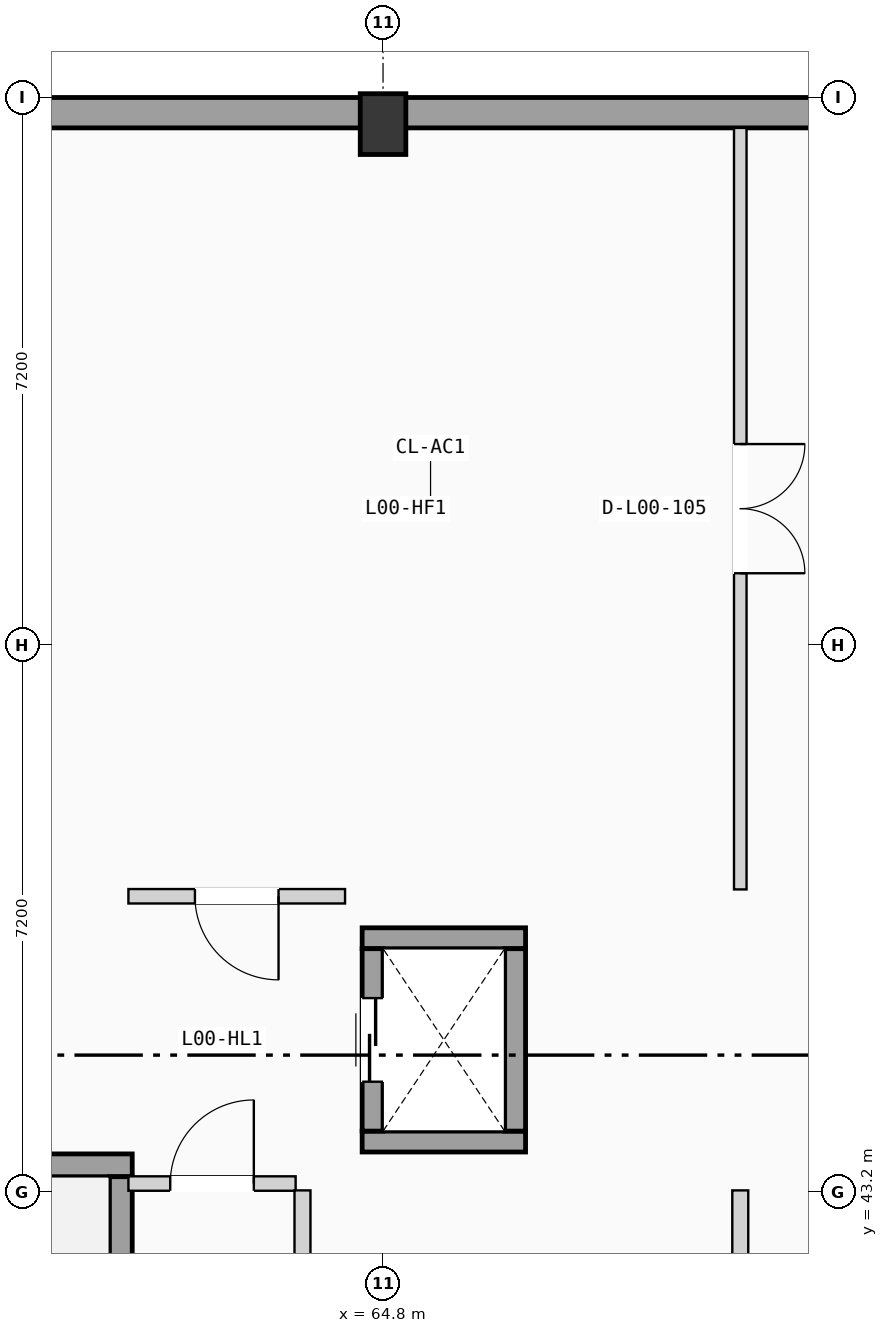
"""IFC4 building model, lengths in metres.
Left out: names, types, materials, properties, quantities, classifications, styles, units other than length and angle.
Written with IfcOpenShell. Run it as: python <this file> out.ifc"""

import sys

from ifc_helpers import new_model, si_unit, direction, frame, frame_2d, origin, origin_2d, place, context, subcontext, project, spatial, rectangle, extrude, element, fill, save


model = new_model("IFC4")
c1 = context("Model", 3, precision=1e-05, world=origin(), true_north=direction((0.0, 1.0)))
c2 = subcontext(c1, "Body", "Model", "MODEL_VIEW")
j1 = project(units=[si_unit("LENGTHUNIT", "METRE"), si_unit("PLANEANGLEUNIT", "RADIAN")], contexts=[c1])
p1 = place(None, origin())
s1 = spatial("IfcSite", under=j1, at=p1, CompositionType="ELEMENT")
p2 = place(p1, origin())
s2 = spatial("IfcBuilding", under=s1, at=p2, CompositionType="ELEMENT")
p3 = place(p2, origin())
s3 = spatial("IfcBuildingStorey", under=s2, at=p3, CompositionType="ELEMENT", Elevation=0.0)
p4 = place(p3, frame((64.8, 57.25, 0.0), z_axis=(0.0, 0.0, 1.0), x_axis=(1.0, 0.0, 0.0)))
e1 = element("IfcColumn", 1, at=p4, inside=s3, PredefinedType="COLUMN", context=c2, shape_type="SweptSolid", body=[
    extrude(rectangle(XDim=0.6, YDim=0.8, at=origin_2d()), origin(), (0.0, 0.0, 1.0), 4.9),
])
p5 = place(p3, frame((57.6, 57.4, 0.0), z_axis=(0.0, 0.0, 1.0), x_axis=(1.0, 0.0, 0.0)))
e2 = element("IfcWall", 2, at=p5, inside=s3, PredefinedType="SOLIDWALL", context=c2, shape_type="SweptSolid", body=[
    extrude(rectangle(XDim=50.4, YDim=0.4, at=frame_2d((25.2, 0.0))), origin(), (0.0, 0.0, 1.0), 4.63),
])
p6 = place(p5, frame((47.5, 0.0, 0.0)))
e3 = element("IfcOpeningElement", 3, at=p6, cuts=e2, PredefinedType="OPENING", context=c2, shape_type="SweptSolid", body=[
    extrude(rectangle(XDim=1.3, YDim=2.2, at=frame_2d((0.65, 1.1))), frame((0.0, 0.21, 0.0), z_axis=(0.0, -1.0, 0.0), x_axis=(1.0, 0.0, 0.0)), (0.0, 0.0, 1.0), 0.42),
])
p7 = place(p5, frame((24.15, 0.0, 0.0)))
e4 = element("IfcOpeningElement", 4, at=p7, cuts=e2, PredefinedType="OPENING", context=c2, shape_type="SweptSolid", body=[
    extrude(rectangle(XDim=2.1, YDim=2.45, at=frame_2d((1.05, 1.225))), frame((0.0, 0.21, 0.0), z_axis=(0.0, -1.0, 0.0), x_axis=(1.0, 0.0, 0.0)), (0.0, 0.0, 1.0), 0.42),
])
p8 = place(p3, frame((57.9, 43.55, 0.0), z_axis=(0.0, 0.0, 1.0), x_axis=(1.0, 0.0, 0.0)))
e5 = element("IfcWall", 5, at=p8, inside=s3, PredefinedType="SHEAR", context=c2, shape_type="SweptSolid", body=[
    extrude(rectangle(XDim=3.6, YDim=0.3, at=frame_2d((1.8, 0.0))), origin(), (0.0, 0.0, 1.0), 4.63),
])
p9 = place(p3, frame((61.35, 36.4, 0.0), z_axis=(0.0, 0.0, 1.0), x_axis=(0.0, 1.0, 0.0)))
e6 = element("IfcWall", 6, at=p9, inside=s3, PredefinedType="SHEAR", context=c2, shape_type="SweptSolid", body=[
    extrude(rectangle(XDim=7.0, YDim=0.3, at=frame_2d((3.5, 0.0))), origin(), (0.0, 0.0, 1.0), 4.63),
])
p10 = place(p9, frame((0.225, 0.0, 0.0)))
e7 = element("IfcOpeningElement", 7, at=p10, cuts=e6, PredefinedType="OPENING", context=c2, shape_type="SweptSolid", body=[
    extrude(rectangle(XDim=1.15, YDim=2.12, at=frame_2d((0.575, 1.06))), frame((0.0, 0.16, 0.0), z_axis=(0.0, -1.0, 0.0), x_axis=(1.0, 0.0, 0.0)), (0.0, 0.0, 1.0), 0.32),
])
for number, where, z_axis, x_axis in (
    (8, (64.525, 43.863, 0.0), (0.0, 0.0, 1.0), (1.0, 0.0, 0.0)),
    (9, (64.525, 46.538, 0.0), (0.0, 0.0, 1.0), (1.0, 0.0, 0.0)),
):
    element("IfcWall", number, at=place(p3, frame(where, z_axis=z_axis, x_axis=x_axis)), inside=s3, PredefinedType="SHEAR", context=c2, shape_type="SweptSolid", body=[
        extrude(rectangle(XDim=2.15, YDim=0.275, at=frame_2d((1.075, 0.0))), origin(), (0.0, 0.0, 1.0), 4.63),
    ])
p11 = place(p3, frame((64.663, 44.0, 0.0), z_axis=(0.0, 0.0, 1.0), x_axis=(0.0, 1.0, 0.0)))
e10 = element("IfcWall", 10, at=p11, inside=s3, PredefinedType="SHEAR", context=c2, shape_type="SweptSolid", body=[
    extrude(rectangle(XDim=2.4, YDim=0.275, at=frame_2d((1.2, 0.0))), origin(), (0.0, 0.0, 1.0), 4.63),
])
p12 = place(p11, frame((0.65, 0.0, 0.0)))
e11 = element("IfcOpeningElement", 11, at=p12, cuts=e10, PredefinedType="OPENING", context=c2, shape_type="SweptSolid", body=[
    extrude(rectangle(XDim=1.1, YDim=2.15, at=frame_2d((0.55, 1.075))), frame((0.0, 0.147, 0.0), z_axis=(0.0, -1.0, 0.0), x_axis=(1.0, 0.0, 0.0)), (0.0, 0.0, 1.0), 0.295),
])
p13 = place(p3, frame((66.538, 44.0, 0.0), z_axis=(0.0, 0.0, 1.0), x_axis=(0.0, 1.0, 0.0)))
e12 = element("IfcWall", 12, at=p13, inside=s3, PredefinedType="SHEAR", context=c2, shape_type="SweptSolid", body=[
    extrude(rectangle(XDim=2.4, YDim=0.275, at=frame_2d((1.2, 0.0))), origin(), (0.0, 0.0, 1.0), 4.63),
])
p14 = place(p3, frame((61.45, 43.31, 0.0), z_axis=(0.0, 0.0, 1.0), x_axis=(1.0, 0.0, 0.0)))
e13 = element("IfcWall", 13, at=p14, inside=s3, PredefinedType="PARTITIONING", context=c2, shape_type="SweptSolid", body=[
    extrude(rectangle(XDim=2.2, YDim=0.19, at=frame_2d((1.1, 0.0))), origin(), (0.0, 0.0, 1.0), 3.84),
])
p15 = place(p14, frame((0.55, 0.0, 0.0)))
e14 = element("IfcOpeningElement", 14, at=p15, cuts=e13, PredefinedType="OPENING", context=c2, shape_type="SweptSolid", body=[
    extrude(rectangle(XDim=1.1, YDim=2.12, at=frame_2d((0.55, 1.06))), frame((0.0, 0.105, 0.0), z_axis=(0.0, -1.0, 0.0), x_axis=(1.0, 0.0, 0.0)), (0.0, 0.0, 1.0), 0.21),
])
p16 = place(p3, frame((63.74, 36.4, 0.0), z_axis=(0.0, 0.0, 1.0), x_axis=(0.0, 1.0, 0.0)))
e15 = element("IfcWall", 15, at=p16, inside=s3, PredefinedType="PARTITIONING", context=c2, shape_type="SweptSolid", body=[
    extrude(rectangle(XDim=6.82, YDim=0.21, at=frame_2d((3.41, 0.0))), origin(), (0.0, 0.0, 1.0), 3.84),
])
p17 = place(p16, frame((2.9, 0.0, 0.0)))
e16 = element("IfcOpeningElement", 16, at=p17, cuts=e15, PredefinedType="OPENING", context=c2, shape_type="SweptSolid", body=[
    extrude(rectangle(XDim=1.02, YDim=2.16, at=frame_2d((0.51, 1.08))), frame((0.0, 0.115, 0.0), z_axis=(0.0, -1.0, 0.0), x_axis=(1.0, 0.0, 0.0)), (0.0, 0.0, 1.0), 0.23),
])
p18 = place(p3, frame((61.45, 47.09, 0.0), z_axis=(0.0, 0.0, 1.0), x_axis=(1.0, 0.0, 0.0)))
e17 = element("IfcWall", 17, at=p18, inside=s3, PredefinedType="PARTITIONING", context=c2, shape_type="SweptSolid", body=[
    extrude(rectangle(XDim=2.85, YDim=0.19, at=frame_2d((1.425, 0.0))), origin(), (0.0, 0.0, 1.0), 3.84),
])
p19 = place(p18, frame((0.875, 0.0, 0.0)))
e18 = element("IfcOpeningElement", 18, at=p19, cuts=e17, PredefinedType="OPENING", context=c2, shape_type="SweptSolid", body=[
    extrude(rectangle(XDim=1.1, YDim=2.12, at=frame_2d((0.55, 1.06))), frame((0.0, 0.105, 0.0), z_axis=(0.0, -1.0, 0.0), x_axis=(1.0, 0.0, 0.0)), (0.0, 0.0, 1.0), 0.21),
])
p20 = place(p3, frame((69.5, 47.18, 0.0), z_axis=(0.0, 0.0, 1.0), x_axis=(0.0, 1.0, 0.0)))
e19 = element("IfcWall", 19, at=p20, inside=s3, PredefinedType="PARTITIONING", context=c2, shape_type="SweptSolid", body=[
    extrude(rectangle(XDim=10.02, YDim=0.165, at=frame_2d((5.01, 0.0))), origin(), (0.0, 0.0, 1.0), 3.84),
])
p21 = place(p20, frame((4.16, 0.0, 0.0)))
e20 = element("IfcOpeningElement", 20, at=p21, cuts=e19, PredefinedType="OPENING", context=c2, shape_type="SweptSolid", body=[
    extrude(rectangle(XDim=1.7, YDim=2.28, at=frame_2d((0.85, 1.14))), frame((0.0, 0.093, 0.0), z_axis=(0.0, -1.0, 0.0), x_axis=(1.0, 0.0, 0.0)), (0.0, 0.0, 1.0), 0.185),
])
p22 = place(p3, frame((69.5, 39.4, 0.0), z_axis=(0.0, 0.0, 1.0), x_axis=(0.0, 1.0, 0.0)))
e21 = element("IfcWall", 21, at=p22, inside=s3, PredefinedType="PARTITIONING", context=c2, shape_type="SweptSolid", body=[
    extrude(rectangle(XDim=3.82, YDim=0.21, at=frame_2d((1.91, 0.0))), origin(), (0.0, 0.0, 1.0), 3.84),
])
p23 = place(p22, frame((1.34, 0.0, 0.0)))
e22 = element("IfcOpeningElement", 22, at=p23, cuts=e21, PredefinedType="OPENING", context=c2, shape_type="SweptSolid", body=[
    extrude(rectangle(XDim=1.14, YDim=2.18, at=frame_2d((0.57, 1.09))), frame((0.0, 0.115, 0.0), z_axis=(0.0, -1.0, 0.0), x_axis=(1.0, 0.0, 0.0)), (0.0, 0.0, 1.0), 0.23),
])
p24 = place(p12, origin())
e23 = element("IfcDoor", 23, at=p24, inside=s3, OperationType="SLIDING_TO_LEFT", PredefinedType="DOOR", context=c2, shape_type="SweptSolid", body=[
    extrude(rectangle(XDim=1.1, YDim=2.15, at=frame_2d((0.55, 1.075))), frame((0.0, 0.025, 0.0), z_axis=(0.0, -1.0, 0.0), x_axis=(1.0, 0.0, 0.0)), (0.0, 0.0, 1.0), 0.05),
])
fill(e11, e23)
p25 = place(p15, origin())
e24 = element("IfcDoor", 24, at=p25, inside=s3, OperationType="SINGLE_SWING_RIGHT", PredefinedType="DOOR", context=c2, shape_type="SweptSolid", body=[
    extrude(rectangle(XDim=1.1, YDim=2.12, at=frame_2d((0.55, 1.06))), frame((0.0, 0.025, 0.0), z_axis=(0.0, -1.0, 0.0), x_axis=(1.0, 0.0, 0.0)), (0.0, 0.0, 1.0), 0.05),
])
fill(e14, e24)
p26 = place(p19, frame((1.1, 0.0, 0.0), z_axis=(0.0, 0.0, 1.0), x_axis=(-1.0, 0.0, 0.0)))
e25 = element("IfcDoor", 25, at=p26, inside=s3, OperationType="SINGLE_SWING_RIGHT", PredefinedType="DOOR", context=c2, shape_type="SweptSolid", body=[
    extrude(rectangle(XDim=1.1, YDim=2.12, at=frame_2d((0.55, 1.06))), frame((0.0, 0.025, 0.0), z_axis=(0.0, -1.0, 0.0), x_axis=(1.0, 0.0, 0.0)), (0.0, 0.0, 1.0), 0.05),
])
fill(e18, e25)
p27 = place(p21, frame((1.7, 0.0, 0.0), z_axis=(0.0, 0.0, 1.0), x_axis=(-1.0, 0.0, 0.0)))
e26 = element("IfcDoor", 26, at=p27, inside=s3, OperationType="DOUBLE_DOOR_SINGLE_SWING", PredefinedType="DOOR", context=c2, shape_type="SweptSolid", body=[
    extrude(rectangle(XDim=1.7, YDim=2.28, at=frame_2d((0.85, 1.14))), frame((0.0, 0.025, 0.0), z_axis=(0.0, -1.0, 0.0), x_axis=(1.0, 0.0, 0.0)), (0.0, 0.0, 1.0), 0.05),
])
fill(e20, e26)
save(model, sys.argv[1])
